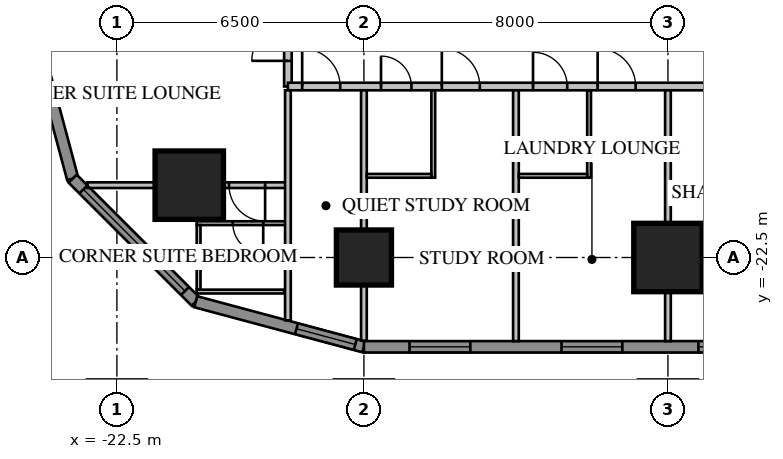
"""IFC4 building model, lengths in metres.
Left out: names, types, materials, properties, quantities, classifications, styles, units other than length and angle.
Written with IfcOpenShell. Run it as: python <this file> out.ifc"""

import sys

from ifc_helpers import new_model, si_unit, direction, frame, frame_2d, origin, origin_2d, place, context, subcontext, project, spatial, rectangle, extrude, element, fill, save


model = new_model("IFC4")
c1 = context("Model", 3, precision=1e-05, world=origin(), true_north=direction((0.0, 1.0)))
c2 = subcontext(c1, "Body", "Model", "MODEL_VIEW")
j1 = project(units=[si_unit("LENGTHUNIT", "METRE"), si_unit("PLANEANGLEUNIT", "RADIAN")], contexts=[c1])
p1 = place(None, origin())
s1 = spatial("IfcSite", under=j1, at=p1, CompositionType="ELEMENT")
p2 = place(p1, origin())
s2 = spatial("IfcBuilding", under=s1, at=p2, CompositionType="ELEMENT")
p3 = place(p2, frame((0.0, 0.0, 19.85)))
s3 = spatial("IfcBuildingStorey", under=s2, at=p3, CompositionType="ELEMENT", Elevation=19.85)
p4 = place(p3, frame((-20.596, -20.596, 0.0), z_axis=(0.0, 0.0, 1.0), x_axis=(1.0, 0.0, 0.0)))
e1 = element("IfcColumn", 1, at=p4, inside=s3, PredefinedType="COLUMN", context=c2, shape_type="SweptSolid", body=[
    extrude(rectangle(XDim=1.8, YDim=1.8, at=origin_2d()), origin(), (0.0, 0.0, 1.0), 3.85),
])
p5 = place(p3, frame((-16.0, -22.5, 0.0), z_axis=(0.0, 0.0, 1.0), x_axis=(1.0, 0.0, 0.0)))
e2 = element("IfcColumn", 2, at=p5, inside=s3, PredefinedType="COLUMN", context=c2, shape_type="SweptSolid", body=[
    extrude(rectangle(XDim=1.45, YDim=1.45, at=origin_2d()), origin(), (0.0, 0.0, 1.0), 3.85),
])
p6 = place(p3, frame((-8.0, -22.5, 0.0), z_axis=(0.0, 0.0, 1.0), x_axis=(1.0, 0.0, 0.0)))
e3 = element("IfcColumn", 3, at=p6, inside=s3, PredefinedType="COLUMN", context=c2, shape_type="SweptSolid", body=[
    extrude(rectangle(XDim=1.8, YDim=1.8, at=origin_2d()), origin(), (0.0, 0.0, 1.0), 3.85),
])
p7 = place(p3, frame((-24.85, -16.0, 0.0), z_axis=(0.0, 0.0, 1.0), x_axis=(0.258839972501, -0.965920218567, 0.0)))
e4 = element("IfcWall", 4, at=p7, inside=s3, PredefinedType="SOLIDWALL", context=c2, shape_type="SweptSolid", body=[
    extrude(rectangle(XDim=4.581, YDim=0.3, at=frame_2d((2.291, 0.0))), origin(), (0.0, 0.0, 1.0), 3.65),
])
p8 = place(p3, frame((-23.664, -20.425, 0.0), z_axis=(0.0, 0.0, 1.0), x_axis=(0.707106781187, -0.707106781187, 0.0)))
e5 = element("IfcWall", 5, at=p8, inside=s3, PredefinedType="SOLIDWALL", context=c2, shape_type="SweptSolid", body=[
    extrude(rectangle(XDim=4.581, YDim=0.3, at=frame_2d((2.291, 0.0))), origin(), (0.0, 0.0, 1.0), 3.65),
])
p9 = place(p8, frame((0.4, 0.0, 0.75)))
e6 = element("IfcOpeningElement", 6, at=p9, cuts=e5, PredefinedType="OPENING", context=c2, shape_type="SweptSolid", body=[
    extrude(rectangle(XDim=3.781, YDim=1.8, at=frame_2d((1.891, 0.9))), frame((0.0, 0.17, 0.0), z_axis=(0.0, -1.0, 0.0), x_axis=(1.0, 0.0, 0.0)), (0.0, 0.0, 1.0), 0.34),
])
p10 = place(p3, frame((-20.425, -23.664, 0.0), z_axis=(0.0, 0.0, 1.0), x_axis=(0.965920218567, -0.258839972501, 0.0)))
e7 = element("IfcWall", 7, at=p10, inside=s3, PredefinedType="SOLIDWALL", context=c2, shape_type="SweptSolid", body=[
    extrude(rectangle(XDim=4.581, YDim=0.3, at=frame_2d((2.291, 0.0))), origin(), (0.0, 0.0, 1.0), 3.65),
])
p11 = place(p10, frame((2.746, 0.0, 0.75)))
e8 = element("IfcOpeningElement", 8, at=p11, cuts=e7, PredefinedType="OPENING", context=c2, shape_type="SweptSolid", body=[
    extrude(rectangle(XDim=1.6, YDim=1.8, at=frame_2d((0.8, 0.9))), frame((0.0, 0.17, 0.0), z_axis=(0.0, -1.0, 0.0), x_axis=(1.0, 0.0, 0.0)), (0.0, 0.0, 1.0), 0.34),
])
p12 = place(p3, frame((-16.0, -24.85, 0.0), z_axis=(0.0, 0.0, 1.0), x_axis=(1.0, 0.0, 0.0)))
e9 = element("IfcWall", 9, at=p12, inside=s3, PredefinedType="SOLIDWALL", context=c2, shape_type="SweptSolid", body=[
    extrude(rectangle(XDim=32.0, YDim=0.3, at=frame_2d((16.0, 0.0))), origin(), (0.0, 0.0, 1.0), 3.65),
])
p13 = place(p12, frame((1.2, 0.0, 0.75)))
e10 = element("IfcOpeningElement", 10, at=p13, cuts=e9, PredefinedType="OPENING", context=c2, shape_type="SweptSolid", body=[
    extrude(rectangle(XDim=1.6, YDim=1.8, at=frame_2d((0.8, 0.9))), frame((0.0, 0.17, 0.0), z_axis=(0.0, -1.0, 0.0), x_axis=(1.0, 0.0, 0.0)), (0.0, 0.0, 1.0), 0.34),
])
p14 = place(p12, frame((5.2, 0.0, 0.75)))
e11 = element("IfcOpeningElement", 11, at=p14, cuts=e9, PredefinedType="OPENING", context=c2, shape_type="SweptSolid", body=[
    extrude(rectangle(XDim=1.6, YDim=1.8, at=frame_2d((0.8, 0.9))), frame((0.0, 0.17, 0.0), z_axis=(0.0, -1.0, 0.0), x_axis=(1.0, 0.0, 0.0)), (0.0, 0.0, 1.0), 0.34),
])
p15 = place(p12, frame((17.2, 0.0, 0.75)))
e12 = element("IfcOpeningElement", 12, at=p15, cuts=e9, PredefinedType="OPENING", context=c2, shape_type="SweptSolid", body=[
    extrude(rectangle(XDim=1.6, YDim=1.8, at=frame_2d((0.8, 0.9))), frame((0.0, 0.17, 0.0), z_axis=(0.0, -1.0, 0.0), x_axis=(1.0, 0.0, 0.0)), (0.0, 0.0, 1.0), 0.34),
])
p16 = place(p12, frame((21.2, 0.0, 0.75)))
e13 = element("IfcOpeningElement", 13, at=p16, cuts=e9, PredefinedType="OPENING", context=c2, shape_type="SweptSolid", body=[
    extrude(rectangle(XDim=1.6, YDim=1.8, at=frame_2d((0.8, 0.9))), frame((0.0, 0.17, 0.0), z_axis=(0.0, -1.0, 0.0), x_axis=(1.0, 0.0, 0.0)), (0.0, 0.0, 1.0), 0.34),
])
p17 = place(p12, frame((25.2, 0.0, 0.75)))
e14 = element("IfcOpeningElement", 14, at=p17, cuts=e9, PredefinedType="OPENING", context=c2, shape_type="SweptSolid", body=[
    extrude(rectangle(XDim=1.6, YDim=1.8, at=frame_2d((0.8, 0.9))), frame((0.0, 0.17, 0.0), z_axis=(0.0, -1.0, 0.0), x_axis=(1.0, 0.0, 0.0)), (0.0, 0.0, 1.0), 0.34),
])
p18 = place(p12, frame((29.2, 0.0, 0.75)))
e15 = element("IfcOpeningElement", 15, at=p18, cuts=e9, PredefinedType="OPENING", context=c2, shape_type="SweptSolid", body=[
    extrude(rectangle(XDim=1.6, YDim=1.8, at=frame_2d((0.8, 0.9))), frame((0.0, 0.17, 0.0), z_axis=(0.0, -1.0, 0.0), x_axis=(1.0, 0.0, 0.0)), (0.0, 0.0, 1.0), 0.34),
])
p19 = place(p12, frame((8.8, 0.0, 0.75)))
e16 = element("IfcOpeningElement", 16, at=p19, cuts=e9, PredefinedType="OPENING", context=c2, shape_type="SweptSolid", body=[
    extrude(rectangle(XDim=2.4, YDim=1.8, at=frame_2d((1.2, 0.9))), frame((0.0, 0.17, 0.0), z_axis=(0.0, -1.0, 0.0), x_axis=(1.0, 0.0, 0.0)), (0.0, 0.0, 1.0), 0.34),
])
p20 = place(p12, frame((13.812, 0.0, 0.0)))
e17 = element("IfcOpeningElement", 17, at=p20, cuts=e9, PredefinedType="OPENING", context=c2, shape_type="SweptSolid", body=[
    extrude(rectangle(XDim=1.0, YDim=2.4, at=frame_2d((0.5, 1.2))), frame((0.0, 0.17, 0.0), z_axis=(0.0, -1.0, 0.0), x_axis=(1.0, 0.0, 0.0)), (0.0, 0.0, 1.0), 0.34),
])
p21 = place(p3, frame((-18.0, 18.0, 0.0), z_axis=(0.0, 0.0, 1.0), x_axis=(0.0, -1.0, 0.0)))
e18 = element("IfcWall", 18, at=p21, inside=s3, PredefinedType="PARTITIONING", context=c2, shape_type="SweptSolid", body=[
    extrude(rectangle(XDim=36.0, YDim=0.2, at=frame_2d((18.0, 0.0))), origin(), (0.0, 0.0, 1.0), 3.65),
])
p22 = place(p21, frame((10.4, 0.0, 0.0)))
e19 = element("IfcOpeningElement", 19, at=p22, cuts=e18, PredefinedType="OPENING", context=c2, shape_type="SweptSolid", body=[
    extrude(rectangle(XDim=1.0, YDim=2.1, at=frame_2d((0.5, 1.05))), frame((0.0, 0.12, 0.0), z_axis=(0.0, -1.0, 0.0), x_axis=(1.0, 0.0, 0.0)), (0.0, 0.0, 1.0), 0.24),
])
p23 = place(p21, frame((14.4, 0.0, 0.0)))
e20 = element("IfcOpeningElement", 20, at=p23, cuts=e18, PredefinedType="OPENING", context=c2, shape_type="SweptSolid", body=[
    extrude(rectangle(XDim=1.0, YDim=2.1, at=frame_2d((0.5, 1.05))), frame((0.0, 0.12, 0.0), z_axis=(0.0, -1.0, 0.0), x_axis=(1.0, 0.0, 0.0)), (0.0, 0.0, 1.0), 0.24),
])
p24 = place(p21, frame((0.375, 0.0, 0.0)))
e21 = element("IfcOpeningElement", 21, at=p24, cuts=e18, PredefinedType="OPENING", context=c2, shape_type="SweptSolid", body=[
    extrude(rectangle(XDim=1.0, YDim=2.1, at=frame_2d((0.5, 1.05))), frame((0.0, 0.12, 0.0), z_axis=(0.0, -1.0, 0.0), x_axis=(1.0, 0.0, 0.0)), (0.0, 0.0, 1.0), 0.24),
])
p25 = place(p21, frame((34.375, 0.0, 0.0)))
e22 = element("IfcOpeningElement", 22, at=p25, cuts=e18, PredefinedType="OPENING", context=c2, shape_type="SweptSolid", body=[
    extrude(rectangle(XDim=0.95, YDim=2.1, at=frame_2d((0.475, 1.05))), frame((0.0, 0.12, 0.0), z_axis=(0.0, -1.0, 0.0), x_axis=(1.0, 0.0, 0.0)), (0.0, 0.0, 1.0), 0.24),
])
p26 = place(p3, frame((-18.065, -21.596, 0.0), z_axis=(0.0, 0.0, 1.0), x_axis=(-1.0, 0.0, 0.0)))
e23 = element("IfcWall", 23, at=p26, inside=s3, PredefinedType="PARTITIONING", context=c2, shape_type="SweptSolid", body=[
    extrude(rectangle(XDim=2.335, YDim=0.1, at=frame_2d((1.167, 0.0))), origin(), (0.0, 0.0, 1.0), 3.65),
])
p27 = place(p26, frame((0.585, 0.0, 0.0)))
e24 = element("IfcOpeningElement", 24, at=p27, cuts=e23, PredefinedType="OPENING", context=c2, shape_type="SweptSolid", body=[
    extrude(rectangle(XDim=0.8, YDim=2.1, at=frame_2d((0.4, 1.05))), frame((0.0, 0.07, 0.0), z_axis=(0.0, -1.0, 0.0), x_axis=(1.0, 0.0, 0.0)), (0.0, 0.0, 1.0), 0.14),
])
p28 = place(p3, frame((-20.35, -21.646, 0.0), z_axis=(0.0, 0.0, 1.0), x_axis=(0.0, -1.0, 0.0)))
e25 = element("IfcWall", 25, at=p28, inside=s3, PredefinedType="PARTITIONING", context=c2, shape_type="SweptSolid", body=[
    extrude(rectangle(XDim=1.7, YDim=0.1, at=frame_2d((0.85, 0.0))), origin(), (0.0, 0.0, 1.0), 3.65),
])
p29 = place(p3, frame((-18.1, -23.396, 0.0), z_axis=(0.0, 0.0, 1.0), x_axis=(-1.0, 0.0, 0.0)))
e26 = element("IfcWall", 26, at=p29, inside=s3, PredefinedType="PARTITIONING", context=c2, shape_type="SweptSolid", body=[
    extrude(rectangle(XDim=2.3, YDim=0.1, at=frame_2d((1.15, 0.0))), origin(), (0.0, 0.0, 1.0), 3.65),
])
p30 = place(p3, frame((-18.065, -20.596, 0.0), z_axis=(0.0, 0.0, 1.0), x_axis=(-1.0, 0.0, 0.0)))
e27 = element("IfcWall", 27, at=p30, inside=s3, PredefinedType="PARTITIONING", context=c2, shape_type="SweptSolid", body=[
    extrude(rectangle(XDim=5.209, YDim=0.15, at=frame_2d((2.604, 0.0))), origin(), (0.0, 0.0, 1.0), 3.65),
])
p31 = place(p30, frame((0.535, 0.0, 0.0)))
e28 = element("IfcOpeningElement", 28, at=p31, cuts=e27, PredefinedType="OPENING", context=c2, shape_type="SweptSolid", body=[
    extrude(rectangle(XDim=0.95, YDim=2.1, at=frame_2d((0.475, 1.05))), frame((0.0, 0.095, 0.0), z_axis=(0.0, -1.0, 0.0), x_axis=(1.0, 0.0, 0.0)), (0.0, 0.0, 1.0), 0.19),
])
p32 = place(p3, frame((-18.0, -18.0, 0.0), z_axis=(0.0, 0.0, 1.0), x_axis=(1.0, 0.0, 0.0)))
e29 = element("IfcWall", 29, at=p32, inside=s3, PredefinedType="PARTITIONING", context=c2, shape_type="SweptSolid", body=[
    extrude(rectangle(XDim=36.0, YDim=0.2, at=frame_2d((18.0, 0.0))), origin(), (0.0, 0.0, 1.0), 3.65),
])
p33 = place(p32, frame((0.375, 0.0, 0.0)))
e30 = element("IfcOpeningElement", 30, at=p33, cuts=e29, PredefinedType="OPENING", context=c2, shape_type="SweptSolid", body=[
    extrude(rectangle(XDim=1.0, YDim=2.1, at=frame_2d((0.5, 1.05))), frame((0.0, 0.12, 0.0), z_axis=(0.0, -1.0, 0.0), x_axis=(1.0, 0.0, 0.0)), (0.0, 0.0, 1.0), 0.24),
])
p34 = place(p32, frame((2.45, 0.0, 0.0)))
e31 = element("IfcOpeningElement", 31, at=p34, cuts=e29, PredefinedType="OPENING", context=c2, shape_type="SweptSolid", body=[
    extrude(rectangle(XDim=0.8, YDim=2.1, at=frame_2d((0.4, 1.05))), frame((0.0, 0.12, 0.0), z_axis=(0.0, -1.0, 0.0), x_axis=(1.0, 0.0, 0.0)), (0.0, 0.0, 1.0), 0.24),
])
p35 = place(p32, frame((4.05, 0.0, 0.0)))
e32 = element("IfcOpeningElement", 32, at=p35, cuts=e29, PredefinedType="OPENING", context=c2, shape_type="SweptSolid", body=[
    extrude(rectangle(XDim=1.0, YDim=2.1, at=frame_2d((0.5, 1.05))), frame((0.0, 0.12, 0.0), z_axis=(0.0, -1.0, 0.0), x_axis=(1.0, 0.0, 0.0)), (0.0, 0.0, 1.0), 0.24),
])
p36 = place(p32, frame((6.45, 0.0, 0.0)))
e33 = element("IfcOpeningElement", 33, at=p36, cuts=e29, PredefinedType="OPENING", context=c2, shape_type="SweptSolid", body=[
    extrude(rectangle(XDim=0.9, YDim=2.1, at=frame_2d((0.45, 1.05))), frame((0.0, 0.12, 0.0), z_axis=(0.0, -1.0, 0.0), x_axis=(1.0, 0.0, 0.0)), (0.0, 0.0, 1.0), 0.24),
])
p37 = place(p32, frame((8.15, 0.0, 0.0)))
e34 = element("IfcOpeningElement", 34, at=p37, cuts=e29, PredefinedType="OPENING", context=c2, shape_type="SweptSolid", body=[
    extrude(rectangle(XDim=1.0, YDim=2.1, at=frame_2d((0.5, 1.05))), frame((0.0, 0.12, 0.0), z_axis=(0.0, -1.0, 0.0), x_axis=(1.0, 0.0, 0.0)), (0.0, 0.0, 1.0), 0.24),
])
p38 = place(p32, frame((19.8, 0.0, 0.0)))
e35 = element("IfcOpeningElement", 35, at=p38, cuts=e29, PredefinedType="OPENING", context=c2, shape_type="SweptSolid", body=[
    extrude(rectangle(XDim=0.95, YDim=2.1, at=frame_2d((0.475, 1.05))), frame((0.0, 0.12, 0.0), z_axis=(0.0, -1.0, 0.0), x_axis=(1.0, 0.0, 0.0)), (0.0, 0.0, 1.0), 0.24),
])
p39 = place(p32, frame((23.8, 0.0, 0.0)))
e36 = element("IfcOpeningElement", 36, at=p39, cuts=e29, PredefinedType="OPENING", context=c2, shape_type="SweptSolid", body=[
    extrude(rectangle(XDim=0.95, YDim=2.1, at=frame_2d((0.475, 1.05))), frame((0.0, 0.12, 0.0), z_axis=(0.0, -1.0, 0.0), x_axis=(1.0, 0.0, 0.0)), (0.0, 0.0, 1.0), 0.24),
])
p40 = place(p32, frame((27.8, 0.0, 0.0)))
e37 = element("IfcOpeningElement", 37, at=p40, cuts=e29, PredefinedType="OPENING", context=c2, shape_type="SweptSolid", body=[
    extrude(rectangle(XDim=0.95, YDim=2.1, at=frame_2d((0.475, 1.05))), frame((0.0, 0.12, 0.0), z_axis=(0.0, -1.0, 0.0), x_axis=(1.0, 0.0, 0.0)), (0.0, 0.0, 1.0), 0.24),
])
p41 = place(p32, frame((31.8, 0.0, 0.0)))
e38 = element("IfcOpeningElement", 38, at=p41, cuts=e29, PredefinedType="OPENING", context=c2, shape_type="SweptSolid", body=[
    extrude(rectangle(XDim=0.95, YDim=2.1, at=frame_2d((0.475, 1.05))), frame((0.0, 0.12, 0.0), z_axis=(0.0, -1.0, 0.0), x_axis=(1.0, 0.0, 0.0)), (0.0, 0.0, 1.0), 0.24),
])
p42 = place(p32, frame((34.375, 0.0, 0.0)))
e39 = element("IfcOpeningElement", 39, at=p42, cuts=e29, PredefinedType="OPENING", context=c2, shape_type="SweptSolid", body=[
    extrude(rectangle(XDim=0.95, YDim=2.1, at=frame_2d((0.475, 1.05))), frame((0.0, 0.12, 0.0), z_axis=(0.0, -1.0, 0.0), x_axis=(1.0, 0.0, 0.0)), (0.0, 0.0, 1.0), 0.24),
])
p43 = place(p32, frame((11.2, 0.0, 0.0)))
e40 = element("IfcOpeningElement", 40, at=p43, cuts=e29, PredefinedType="OPENING", context=c2, shape_type="SweptSolid", body=[
    extrude(rectangle(XDim=1.0, YDim=2.1, at=frame_2d((0.5, 1.05))), frame((0.0, 0.12, 0.0), z_axis=(0.0, -1.0, 0.0), x_axis=(1.0, 0.0, 0.0)), (0.0, 0.0, 1.0), 0.24),
])
p44 = place(p3, frame((-18.0, -18.1, 0.0), z_axis=(0.0, 0.0, 1.0), x_axis=(0.0, -1.0, 0.0)))
e41 = element("IfcWall", 41, at=p44, inside=s3, PredefinedType="PARTITIONING", context=c2, shape_type="SweptSolid", body=[
    extrude(rectangle(XDim=6.053, YDim=0.15, at=frame_2d((3.027, 0.0))), origin(), (0.0, 0.0, 1.0), 3.65),
])
p45 = place(p3, frame((-16.0, -18.1, 0.0), z_axis=(0.0, 0.0, 1.0), x_axis=(0.0, -1.0, 0.0)))
e42 = element("IfcWall", 42, at=p45, inside=s3, PredefinedType="PARTITIONING", context=c2, shape_type="SweptSolid", body=[
    extrude(rectangle(XDim=6.589, YDim=0.15, at=frame_2d((3.295, 0.0))), origin(), (0.0, 0.0, 1.0), 3.65),
])
for number, where, z_axis, x_axis in (
    (43, (-12.0, -18.1, 0.0), (0.0, 0.0, 1.0), (0.0, -1.0, 0.0)),
    (44, (-8.0, -18.1, 0.0), (0.0, 0.0, 1.0), (0.0, -1.0, 0.0)),
):
    element("IfcWall", number, at=place(p3, frame(where, z_axis=z_axis, x_axis=x_axis)), inside=s3, PredefinedType="PARTITIONING", context=c2, shape_type="SweptSolid", body=[
        extrude(rectangle(XDim=6.6, YDim=0.15, at=frame_2d((3.3, 0.0))), origin(), (0.0, 0.0, 1.0), 3.65),
    ])
p46 = place(p3, frame((-14.175, -18.1, 0.0), z_axis=(0.0, 0.0, 1.0), x_axis=(0.0, -1.0, 0.0)))
e45 = element("IfcWall", 45, at=p46, inside=s3, PredefinedType="PARTITIONING", context=c2, shape_type="SweptSolid", body=[
    extrude(rectangle(XDim=2.3, YDim=0.1, at=frame_2d((1.15, 0.0))), origin(), (0.0, 0.0, 1.0), 3.65),
])
p47 = place(p3, frame((-15.925, -20.35, 0.0), z_axis=(0.0, 0.0, 1.0), x_axis=(1.0, 0.0, 0.0)))
e46 = element("IfcWall", 46, at=p47, inside=s3, PredefinedType="PARTITIONING", context=c2, shape_type="SweptSolid", body=[
    extrude(rectangle(XDim=1.7, YDim=0.1, at=frame_2d((0.85, 0.0))), origin(), (0.0, 0.0, 1.0), 3.65),
])
p48 = place(p3, frame((-10.075, -18.1, 0.0), z_axis=(0.0, 0.0, 1.0), x_axis=(0.0, -1.0, 0.0)))
e47 = element("IfcWall", 47, at=p48, inside=s3, PredefinedType="PARTITIONING", context=c2, shape_type="SweptSolid", body=[
    extrude(rectangle(XDim=2.3, YDim=0.1, at=frame_2d((1.15, 0.0))), origin(), (0.0, 0.0, 1.0), 3.65),
])
p49 = place(p3, frame((-11.925, -20.35, 0.0), z_axis=(0.0, 0.0, 1.0), x_axis=(1.0, 0.0, 0.0)))
e48 = element("IfcWall", 48, at=p49, inside=s3, PredefinedType="PARTITIONING", context=c2, shape_type="SweptSolid", body=[
    extrude(rectangle(XDim=1.8, YDim=0.1, at=frame_2d((0.9, 0.0))), origin(), (0.0, 0.0, 1.0), 3.65),
])
p50 = place(p9, origin())
e49 = element("IfcWindow", 49, at=p50, inside=s3, PartitioningType="SINGLE_PANEL", PredefinedType="WINDOW", context=c2, shape_type="SweptSolid", body=[
    extrude(rectangle(XDim=3.781, YDim=1.8, at=frame_2d((1.891, 0.9))), frame((0.0, 0.03, 0.0), z_axis=(0.0, -1.0, 0.0), x_axis=(1.0, 0.0, 0.0)), (0.0, 0.0, 1.0), 0.06),
])
fill(e6, e49)
p51 = place(p11, origin())
e50 = element("IfcWindow", 50, at=p51, inside=s3, PartitioningType="SINGLE_PANEL", PredefinedType="WINDOW", context=c2, shape_type="SweptSolid", body=[
    extrude(rectangle(XDim=1.6, YDim=1.8, at=frame_2d((0.8, 0.9))), frame((0.0, 0.03, 0.0), z_axis=(0.0, -1.0, 0.0), x_axis=(1.0, 0.0, 0.0)), (0.0, 0.0, 1.0), 0.06),
])
fill(e8, e50)
p52 = place(p13, origin())
e51 = element("IfcWindow", 51, at=p52, inside=s3, PartitioningType="SINGLE_PANEL", PredefinedType="WINDOW", context=c2, shape_type="SweptSolid", body=[
    extrude(rectangle(XDim=1.6, YDim=1.8, at=frame_2d((0.8, 0.9))), frame((0.0, 0.03, 0.0), z_axis=(0.0, -1.0, 0.0), x_axis=(1.0, 0.0, 0.0)), (0.0, 0.0, 1.0), 0.06),
])
fill(e10, e51)
p53 = place(p14, origin())
e52 = element("IfcWindow", 52, at=p53, inside=s3, PartitioningType="SINGLE_PANEL", PredefinedType="WINDOW", context=c2, shape_type="SweptSolid", body=[
    extrude(rectangle(XDim=1.6, YDim=1.8, at=frame_2d((0.8, 0.9))), frame((0.0, 0.03, 0.0), z_axis=(0.0, -1.0, 0.0), x_axis=(1.0, 0.0, 0.0)), (0.0, 0.0, 1.0), 0.06),
])
fill(e11, e52)
p54 = place(p19, origin())
e53 = element("IfcWindow", 53, at=p54, inside=s3, PartitioningType="SINGLE_PANEL", PredefinedType="WINDOW", context=c2, shape_type="SweptSolid", body=[
    extrude(rectangle(XDim=2.4, YDim=1.8, at=frame_2d((1.2, 0.9))), frame((0.0, 0.03, 0.0), z_axis=(0.0, -1.0, 0.0), x_axis=(1.0, 0.0, 0.0)), (0.0, 0.0, 1.0), 0.06),
])
fill(e16, e53)
p55 = place(p25, origin())
e54 = element("IfcDoor", 54, at=p55, inside=s3, OperationType="SINGLE_SWING_RIGHT", PredefinedType="DOOR", context=c2, shape_type="SweptSolid", body=[
    extrude(rectangle(XDim=0.95, YDim=2.1, at=frame_2d((0.475, 1.05))), frame((0.0, 0.025, 0.0), z_axis=(0.0, -1.0, 0.0), x_axis=(1.0, 0.0, 0.0)), (0.0, 0.0, 1.0), 0.05),
])
fill(e22, e54)
p56 = place(p27, origin())
e55 = element("IfcDoor", 55, at=p56, inside=s3, OperationType="SINGLE_SWING_LEFT", PredefinedType="DOOR", context=c2, shape_type="SweptSolid", body=[
    extrude(rectangle(XDim=0.8, YDim=2.1, at=frame_2d((0.4, 1.05))), frame((0.0, 0.025, 0.0), z_axis=(0.0, -1.0, 0.0), x_axis=(1.0, 0.0, 0.0)), (0.0, 0.0, 1.0), 0.05),
])
fill(e24, e55)
p57 = place(p31, origin())
e56 = element("IfcDoor", 56, at=p57, inside=s3, OperationType="SINGLE_SWING_LEFT", PredefinedType="DOOR", context=c2, shape_type="SweptSolid", body=[
    extrude(rectangle(XDim=0.95, YDim=2.1, at=frame_2d((0.475, 1.05))), frame((0.0, 0.025, 0.0), z_axis=(0.0, -1.0, 0.0), x_axis=(1.0, 0.0, 0.0)), (0.0, 0.0, 1.0), 0.05),
])
fill(e28, e56)
p58 = place(p33, origin())
e57 = element("IfcDoor", 57, at=p58, inside=s3, OperationType="SINGLE_SWING_LEFT", PredefinedType="DOOR", context=c2, shape_type="SweptSolid", body=[
    extrude(rectangle(XDim=1.0, YDim=2.1, at=frame_2d((0.5, 1.05))), frame((0.0, 0.025, 0.0), z_axis=(0.0, -1.0, 0.0), x_axis=(1.0, 0.0, 0.0)), (0.0, 0.0, 1.0), 0.05),
])
fill(e30, e57)
p59 = place(p34, origin())
e58 = element("IfcDoor", 58, at=p59, inside=s3, OperationType="SINGLE_SWING_LEFT", PredefinedType="DOOR", context=c2, shape_type="SweptSolid", body=[
    extrude(rectangle(XDim=0.8, YDim=2.1, at=frame_2d((0.4, 1.05))), frame((0.0, 0.025, 0.0), z_axis=(0.0, -1.0, 0.0), x_axis=(1.0, 0.0, 0.0)), (0.0, 0.0, 1.0), 0.05),
])
fill(e31, e58)
p60 = place(p35, origin())
e59 = element("IfcDoor", 59, at=p60, inside=s3, OperationType="SINGLE_SWING_LEFT", PredefinedType="DOOR", context=c2, shape_type="SweptSolid", body=[
    extrude(rectangle(XDim=1.0, YDim=2.1, at=frame_2d((0.5, 1.05))), frame((0.0, 0.025, 0.0), z_axis=(0.0, -1.0, 0.0), x_axis=(1.0, 0.0, 0.0)), (0.0, 0.0, 1.0), 0.05),
])
fill(e32, e59)
p61 = place(p36, origin())
e60 = element("IfcDoor", 60, at=p61, inside=s3, OperationType="SINGLE_SWING_LEFT", PredefinedType="DOOR", context=c2, shape_type="SweptSolid", body=[
    extrude(rectangle(XDim=0.9, YDim=2.1, at=frame_2d((0.45, 1.05))), frame((0.0, 0.025, 0.0), z_axis=(0.0, -1.0, 0.0), x_axis=(1.0, 0.0, 0.0)), (0.0, 0.0, 1.0), 0.05),
])
fill(e33, e60)
p62 = place(p37, origin())
e61 = element("IfcDoor", 61, at=p62, inside=s3, OperationType="SINGLE_SWING_LEFT", PredefinedType="DOOR", context=c2, shape_type="SweptSolid", body=[
    extrude(rectangle(XDim=1.0, YDim=2.1, at=frame_2d((0.5, 1.05))), frame((0.0, 0.025, 0.0), z_axis=(0.0, -1.0, 0.0), x_axis=(1.0, 0.0, 0.0)), (0.0, 0.0, 1.0), 0.05),
])
fill(e34, e61)
save(model, sys.argv[1])
